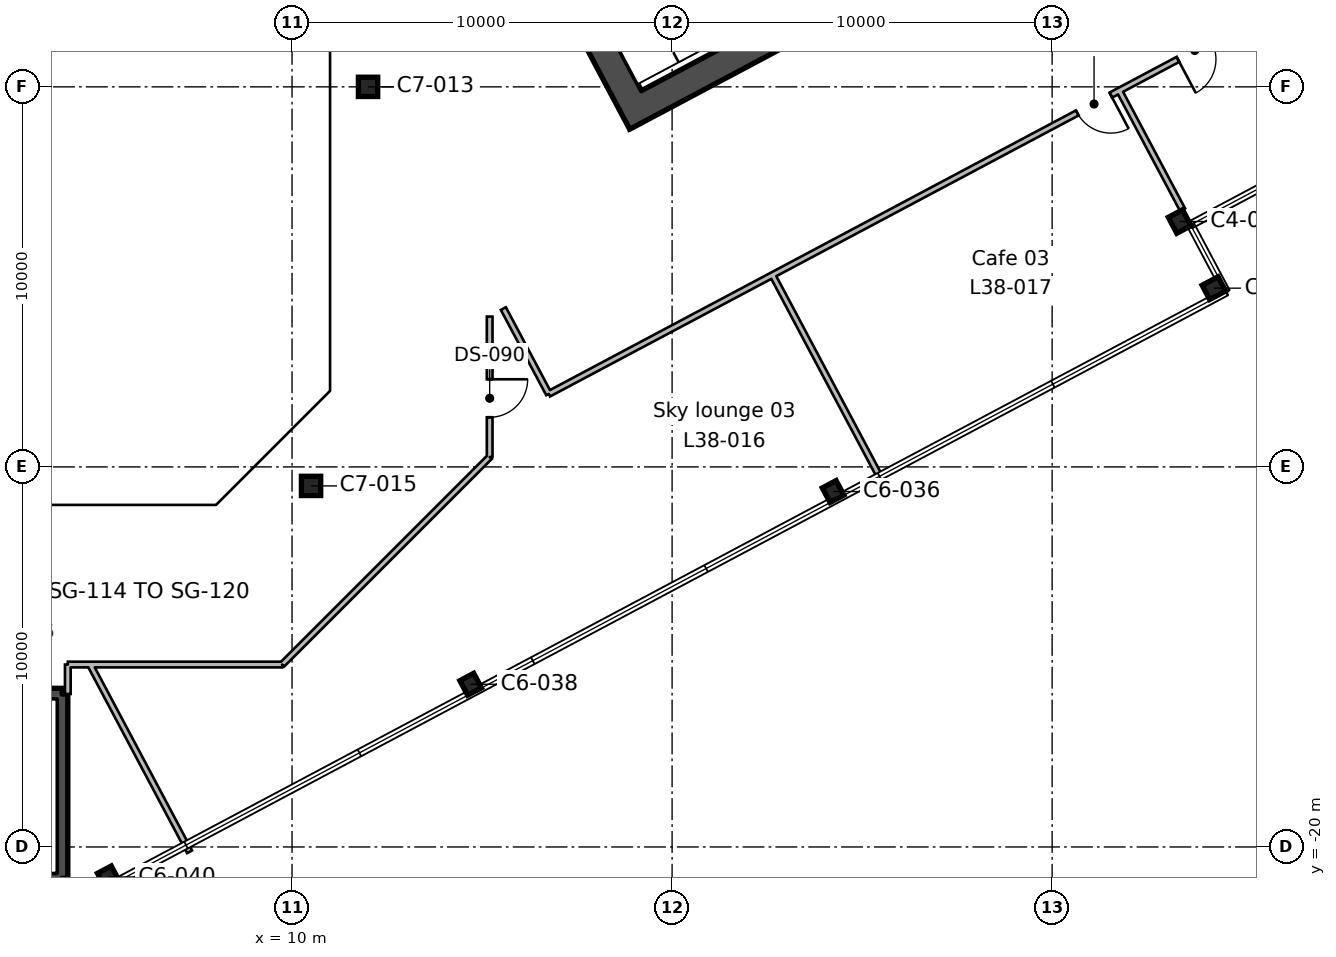
"""IFC4 building model, lengths in metres.
Left out: names, types, materials, properties, quantities, classifications, styles, units other than length and angle.
Written with IfcOpenShell. Run it as: python <this file> out.ifc"""

import sys

from ifc_helpers import new_model, si_unit, direction, frame, frame_2d, origin, origin_2d, place, context, subcontext, project, spatial, rectangle, hollow_rectangle, i_section, extrude, element, fill, save


model = new_model("IFC4")
c1 = context("Model", 3, precision=1e-05, world=origin(), true_north=direction((0.0, 1.0)))
c2 = subcontext(c1, "Body", "Model", "MODEL_VIEW")
j1 = project(units=[si_unit("LENGTHUNIT", "METRE"), si_unit("PLANEANGLEUNIT", "RADIAN")], contexts=[c1])
p1 = place(None, origin())
s1 = spatial("IfcSite", under=j1, at=p1, CompositionType="ELEMENT")
p2 = place(p1, origin())
s2 = spatial("IfcBuilding", under=s1, at=p2, CompositionType="ELEMENT")
p3 = place(p2, frame((0.0, 0.0, 178.2)))
s3 = spatial("IfcBuildingStorey", under=s2, at=p3, CompositionType="ELEMENT", Elevation=178.2)
for number, where, z_axis, x_axis in (
    (1, (5.164, -20.789, 0.0), (0.0, 0.0, 1.0), (0.883, 0.469, 0.0)),
    (2, (14.7, -15.719, 0.0), (0.0, 0.0, 1.0), (0.883, 0.469, 0.0)),
    (3, (24.236, -10.648, 0.0), (0.0, 0.0, 1.0), (0.883, 0.469, 0.0)),
):
    element("IfcColumn", number, at=place(p3, frame(where, z_axis=z_axis, x_axis=x_axis)), inside=s3, PredefinedType="COLUMN", context=c2, shape_type="SweptSolid", body=[
        extrude(i_section(OverallWidth=0.412, OverallDepth=0.434, WebThickness=0.036, FlangeThickness=0.057, FilletRadius=0.015, at=origin_2d()), origin(), (0.0, 0.0, 1.0), 5.4),
    ])
p4 = place(p3, frame((10.5, -10.5, 0.0), z_axis=(0.0, 0.0, 1.0), x_axis=(1.0, 0.0, 0.0)))
e4 = element("IfcColumn", 4, at=p4, inside=s3, PredefinedType="COLUMN", context=c2, shape_type="SweptSolid", body=[
    extrude(hollow_rectangle(XDim=0.508, YDim=0.508, WallThickness=0.012, InnerFilletRadius=0.006, OuterFilletRadius=0.018, at=origin_2d()), origin(), (0.0, 0.0, 1.0), 5.4),
])
for number, where, z_axis, x_axis in (
    (5, (34.256, -5.297, 0.0), (0.0, 0.0, 1.0), (-0.469, 0.883, 0.0)),
    (6, (33.356, -3.543, 0.0), (0.0, 0.0, 1.0), (0.883, 0.469, 0.0)),
):
    element("IfcColumn", number, at=place(p3, frame(where, z_axis=z_axis, x_axis=x_axis)), inside=s3, PredefinedType="COLUMN", context=c2, shape_type="SweptSolid", body=[
        extrude(i_section(OverallWidth=0.424, OverallDepth=0.475, WebThickness=0.048, FlangeThickness=0.077, FilletRadius=0.015, at=origin_2d()), origin(), (0.0, 0.0, 1.0), 5.4),
    ])
p5 = place(p3, frame((12.0, 0.0, 0.0), z_axis=(0.0, 0.0, 1.0), x_axis=(1.0, 0.0, 0.0)))
e7 = element("IfcColumn", 7, at=p5, inside=s3, PredefinedType="COLUMN", context=c2, shape_type="SweptSolid", body=[
    extrude(hollow_rectangle(XDim=0.508, YDim=0.508, WallThickness=0.012, InnerFilletRadius=0.006, OuterFilletRadius=0.018, at=origin_2d()), origin(), (0.0, 0.0, 1.0), 5.4),
])
p6 = place(p3, frame((19.215, -0.939, 0.0), z_axis=(0.0, 0.0, 1.0), x_axis=(-0.469479580143, 0.882943329908, 0.0)))
e8 = element("IfcWall", 8, at=p6, inside=s3, PredefinedType="SHEAR", context=c2, shape_type="SweptSolid", body=[
    extrude(rectangle(XDim=19.7, YDim=0.75, at=frame_2d((9.85, 0.0))), origin(), (0.0, 0.0, 1.0), 5.4),
])
p7 = place(p6, frame((6.85, 0.0, 0.0)))
e9 = element("IfcOpeningElement", 9, at=p7, cuts=e8, PredefinedType="OPENING", context=c2, shape_type="SweptSolid", body=[
    extrude(rectangle(XDim=2.4, YDim=2.4, at=frame_2d((1.2, 1.2))), frame((0.0, 0.385, 0.0), z_axis=(0.0, -1.0, 0.0), x_axis=(1.0, 0.0, 0.0)), (0.0, 0.0, 1.0), 0.77),
])
p8 = place(p3, frame((19.37, -0.432, 0.0), z_axis=(0.0, 0.0, 1.0), x_axis=(0.88294509198, 0.469476266226, 0.0)))
e10 = element("IfcWall", 10, at=p8, inside=s3, PredefinedType="SHEAR", context=c2, shape_type="SweptSolid", body=[
    extrude(rectangle(XDim=20.2, YDim=0.75, at=frame_2d((10.1, 0.0))), origin(), (0.0, 0.0, 1.0), 5.4),
])
p9 = place(p3, frame((3.95, -15.975, 0.0), z_axis=(0.0, 0.0, 1.0), x_axis=(0.0, -1.0, 0.0)))
e11 = element("IfcWall", 11, at=p9, inside=s3, PredefinedType="SHEAR", context=c2, shape_type="SweptSolid", body=[
    extrude(rectangle(XDim=4.85, YDim=0.3, at=frame_2d((2.425, 0.0))), origin(), (0.0, 0.0, 1.0), 5.4),
])
p10 = place(p3, frame((3.95, -20.825, 0.0), z_axis=(0.0, 0.0, 1.0), x_axis=(-1.0, 0.0, 0.0)))
e12 = element("IfcWall", 12, at=p10, inside=s3, PredefinedType="SHEAR", context=c2, shape_type="SweptSolid", body=[
    extrude(rectangle(XDim=8.3, YDim=0.3, at=frame_2d((4.15, 0.0))), origin(), (0.0, 0.0, 1.0), 5.4),
])
p11 = place(p3, frame((-4.35, -15.975, 0.0), z_axis=(0.0, 0.0, 1.0), x_axis=(1.0, 0.0, 0.0)))
e13 = element("IfcWall", 13, at=p11, inside=s3, PredefinedType="SHEAR", context=c2, shape_type="SweptSolid", body=[
    extrude(rectangle(XDim=8.3, YDim=0.3, at=frame_2d((4.15, 0.0))), origin(), (0.0, 0.0, 1.0), 5.4),
])
p12 = place(p11, frame((6.05, 0.0, 0.0)))
e14 = element("IfcOpeningElement", 14, at=p12, cuts=e13, PredefinedType="OPENING", context=c2, shape_type="SweptSolid", body=[
    extrude(rectangle(XDim=1.9, YDim=2.1, at=frame_2d((0.95, 1.05))), frame((0.0, 0.16, 0.0), z_axis=(0.0, -1.0, 0.0), x_axis=(1.0, 0.0, 0.0)), (0.0, 0.0, 1.0), 0.32),
])
p13 = place(p3, frame((4.71, -15.2, 0.0), z_axis=(0.0, 0.0, 1.0), x_axis=(-1.0, 0.0, 0.0)))
e15 = element("IfcWall", 15, at=p13, inside=s3, PredefinedType="PARTITIONING", context=c2, shape_type="SweptSolid", body=[
    extrude(rectangle(XDim=0.61, YDim=0.15, at=frame_2d((0.305, 0.0))), origin(), (0.0, 0.0, 1.0), 4.95),
])
p14 = place(p3, frame((4.1, -15.2, 0.0), z_axis=(0.0, 0.0, 1.0), x_axis=(0.0, -1.0, 0.0)))
e16 = element("IfcWall", 16, at=p14, inside=s3, PredefinedType="PARTITIONING", context=c2, shape_type="SweptSolid", body=[
    extrude(rectangle(XDim=0.775, YDim=0.15, at=frame_2d((0.388, 0.0))), origin(), (0.0, 0.0, 1.0), 4.95),
])
p15 = place(p3, frame((15.2, -6.044, 0.0), z_axis=(0.0, 0.0, 1.0), x_axis=(0.0, -1.0, 0.0)))
e17 = element("IfcWall", 17, at=p15, inside=s3, PredefinedType="PARTITIONING", context=c2, shape_type="SweptSolid", body=[
    extrude(rectangle(XDim=3.696, YDim=0.15, at=frame_2d((1.848, 0.0))), origin(), (0.0, 0.0, 1.0), 4.95),
])
p16 = place(p15, frame((1.65, 0.0, 0.0)))
e18 = element("IfcOpeningElement", 18, at=p16, cuts=e17, PredefinedType="OPENING", context=c2, shape_type="SweptSolid", body=[
    extrude(rectangle(XDim=1.0, YDim=2.1, at=frame_2d((0.5, 1.05))), frame((0.0, 0.085, 0.0), z_axis=(0.0, -1.0, 0.0), x_axis=(1.0, 0.0, 0.0)), (0.0, 0.0, 1.0), 0.17),
])
p17 = place(p3, frame((15.2, -9.74, 0.0), z_axis=(0.0, 0.0, 1.0), x_axis=(-0.707106781187, -0.707106781187, 0.0)))
e19 = element("IfcWall", 19, at=p17, inside=s3, PredefinedType="PARTITIONING", context=c2, shape_type="SweptSolid", body=[
    extrude(rectangle(XDim=7.721, YDim=0.15, at=frame_2d((3.861, 0.0))), origin(), (0.0, 0.0, 1.0), 4.95),
])
p18 = place(p3, frame((9.74, -15.2, 0.0), z_axis=(0.0, 0.0, 1.0), x_axis=(-1.0, 0.0, 0.0)))
e20 = element("IfcWall", 20, at=p18, inside=s3, PredefinedType="PARTITIONING", context=c2, shape_type="SweptSolid", body=[
    extrude(rectangle(XDim=5.03, YDim=0.15, at=frame_2d((2.515, 0.0))), origin(), (0.0, 0.0, 1.0), 4.95),
])
p19 = place(p3, frame((7.304, -20.127, 0.0), z_axis=(0.0, 0.0, 1.0), x_axis=(-0.469354625262, 0.883009759711, 0.0)))
e21 = element("IfcWall", 21, at=p19, inside=s3, PredefinedType="PARTITIONING", context=c2, shape_type="SweptSolid", body=[
    extrude(rectangle(XDim=5.58, YDim=0.15, at=frame_2d((2.79, 0.0))), origin(), (0.0, 0.0, 1.0), 4.95),
])
p20 = place(p3, frame((22.554, -4.997, 0.0), z_axis=(0.0, 0.0, 1.0), x_axis=(-0.883006455356, -0.469360841783, 0.0)))
e22 = element("IfcWall", 22, at=p20, inside=s3, PredefinedType="PARTITIONING", context=c2, shape_type="SweptSolid", body=[
    extrude(rectangle(XDim=6.569, YDim=0.15, at=frame_2d((3.284, 0.0))), origin(), (0.0, 0.0, 1.0), 4.95),
])
p21 = place(p3, frame((15.56, -5.833, 0.0), z_axis=(0.0, 0.0, 1.0), x_axis=(0.469482510872, -0.882941771571, 0.0)))
e23 = element("IfcWall", 23, at=p21, inside=s3, PredefinedType="PARTITIONING", context=c2, shape_type="SweptSolid", body=[
    extrude(rectangle(XDim=2.545, YDim=0.15, at=frame_2d((1.272, 0.0))), origin(), (0.0, 0.0, 1.0), 4.95),
])
p22 = place(p3, frame((22.641, -4.95, 0.0), z_axis=(0.0, 0.0, 1.0), x_axis=(0.469502602833, -0.882931087873, 0.0)))
e24 = element("IfcWall", 24, at=p22, inside=s3, PredefinedType="PARTITIONING", context=c2, shape_type="SweptSolid", body=[
    extrude(rectangle(XDim=6.2, YDim=0.15, at=frame_2d((3.1, 0.0))), origin(), (0.0, 0.0, 1.0), 4.95),
])
p23 = place(p3, frame((45.009, 6.943, 0.0), z_axis=(0.0, 0.0, 1.0), x_axis=(-0.882937671178, -0.469490222279, 0.0)))
e25 = element("IfcWall", 25, at=p23, inside=s3, PredefinedType="PARTITIONING", context=c2, shape_type="SweptSolid", body=[
    extrude(rectangle(XDim=25.432, YDim=0.15, at=frame_2d((12.716, 0.0))), origin(), (0.0, 0.0, 1.0), 4.95),
])
p24 = place(p23, frame((15.25, 0.0, 0.0)))
e26 = element("IfcOpeningElement", 26, at=p24, cuts=e25, PredefinedType="OPENING", context=c2, shape_type="SweptSolid", body=[
    extrude(rectangle(XDim=1.0, YDim=2.1, at=frame_2d((0.5, 1.05))), frame((0.0, 0.085, 0.0), z_axis=(0.0, -1.0, 0.0), x_axis=(1.0, 0.0, 0.0)), (0.0, 0.0, 1.0), 0.17),
])
p25 = place(p23, frame((12.25, 0.0, 0.0)))
e27 = element("IfcOpeningElement", 27, at=p25, cuts=e25, PredefinedType="OPENING", context=c2, shape_type="SweptSolid", body=[
    extrude(rectangle(XDim=1.0, YDim=2.1, at=frame_2d((0.5, 1.05))), frame((0.0, 0.085, 0.0), z_axis=(0.0, -1.0, 0.0), x_axis=(1.0, 0.0, 0.0)), (0.0, 0.0, 1.0), 0.17),
])
p26 = place(p3, frame((31.765, -0.099, 0.0), z_axis=(0.0, 0.0, 1.0), x_axis=(0.469517176884, -0.882923337901, 0.0)))
e28 = element("IfcWall", 28, at=p26, inside=s3, PredefinedType="PARTITIONING", context=c2, shape_type="SweptSolid", body=[
    extrude(rectangle(XDim=3.551, YDim=0.15, at=frame_2d((1.775, 0.0))), origin(), (0.0, 0.0, 1.0), 4.95),
])
p27 = place(p16, origin())
e29 = element("IfcDoor", 29, at=p27, inside=s3, OperationType="SINGLE_SWING_LEFT", PredefinedType="DOOR", context=c2, shape_type="SweptSolid", body=[
    extrude(rectangle(XDim=1.0, YDim=2.1, at=frame_2d((0.5, 1.05))), frame((0.0, 0.025, 0.0), z_axis=(0.0, -1.0, 0.0), x_axis=(1.0, 0.0, 0.0)), (0.0, 0.0, 1.0), 0.05),
])
fill(e18, e29)
p28 = place(p24, origin())
e30 = element("IfcDoor", 30, at=p28, inside=s3, OperationType="SINGLE_SWING_LEFT", PredefinedType="DOOR", context=c2, shape_type="SweptSolid", body=[
    extrude(rectangle(XDim=1.0, YDim=2.1, at=frame_2d((0.5, 1.05))), frame((0.0, 0.025, 0.0), z_axis=(0.0, -1.0, 0.0), x_axis=(1.0, 0.0, 0.0)), (0.0, 0.0, 1.0), 0.05),
])
fill(e26, e30)
p29 = place(p25, origin())
e31 = element("IfcDoor", 31, at=p29, inside=s3, OperationType="SINGLE_SWING_RIGHT", PredefinedType="DOOR", context=c2, shape_type="SweptSolid", body=[
    extrude(rectangle(XDim=1.0, YDim=2.1, at=frame_2d((0.5, 1.05))), frame((0.0, 0.025, 0.0), z_axis=(0.0, -1.0, 0.0), x_axis=(1.0, 0.0, 0.0)), (0.0, 0.0, 1.0), 0.05),
])
fill(e27, e31)
save(model, sys.argv[1])
